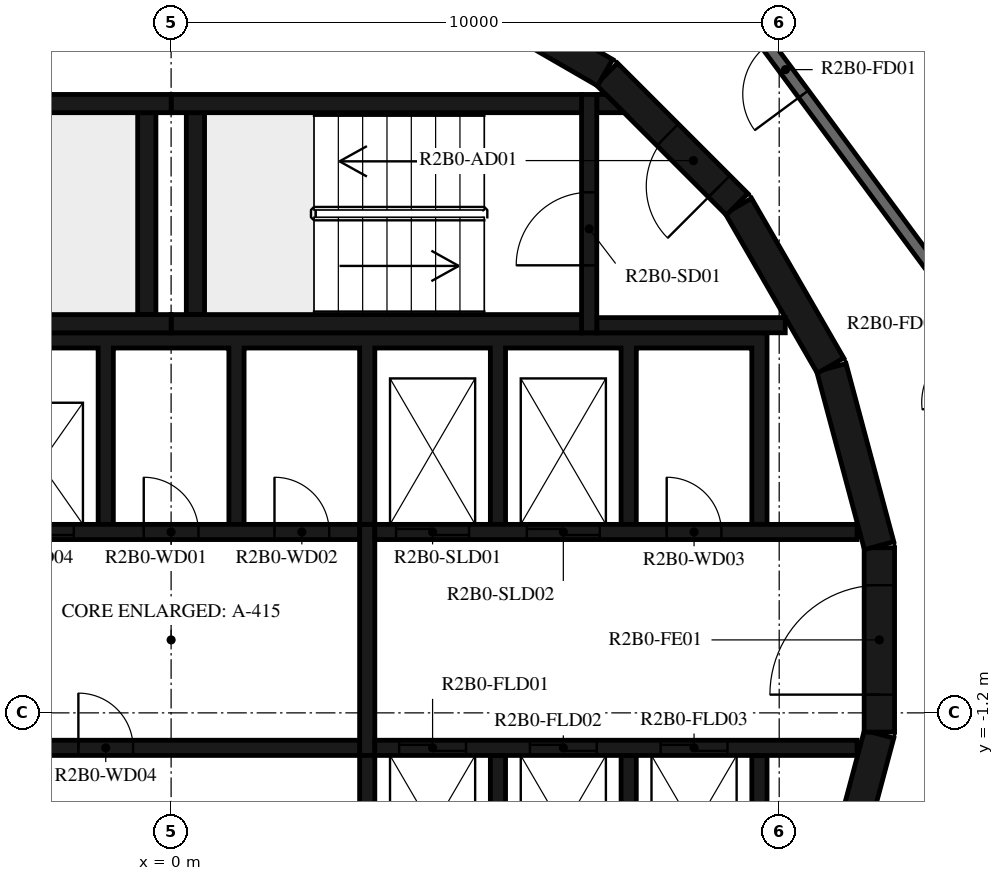
"""IFC4 building model, lengths in metres.
Left out: names, types, materials, properties, quantities, classifications, styles, units other than length and angle.
Written with IfcOpenShell. Run it as: python <this file> out.ifc"""

import sys

from ifc_helpers import new_model, si_unit, direction, frame, frame_2d, origin, place, context, subcontext, project, spatial, polyline, rectangle, outline, extrude, element, fill, save


model = new_model("IFC4")
c1 = context("Model", 3, precision=1e-05, world=origin(), true_north=direction((0.0, 1.0)))
c2 = subcontext(c1, "Body", "Model", "MODEL_VIEW")
j1 = project(units=[si_unit("LENGTHUNIT", "METRE"), si_unit("PLANEANGLEUNIT", "RADIAN")], contexts=[c1])
p1 = place(None, origin())
s1 = spatial("IfcSite", under=j1, at=p1, CompositionType="ELEMENT")
p2 = place(p1, origin())
s2 = spatial("IfcBuilding", under=s1, at=p2, CompositionType="ELEMENT")
p3 = place(p2, frame((0.0, 0.0, 90.7)))
s3 = spatial("IfcBuildingStorey", under=s2, at=p3, CompositionType="ELEMENT", Elevation=90.7)
p4 = place(p3, frame((10.858, -4.479, 0.0), z_axis=(0.0, 0.0, 1.0), x_axis=(0.258734743916, 0.965948410781, 0.0)))
e1 = element("IfcWall", 1, at=p4, inside=s3, PredefinedType="SHEAR", context=c2, shape_type="SweptSolid", body=[
    extrude(rectangle(XDim=3.033, YDim=0.5, at=frame_2d((1.516, 0.0))), origin(), (0.0, 0.0, 1.0), 3.12),
])
p5 = place(p3, frame((11.647, -1.516, 0.0), z_axis=(0.0, 0.0, 1.0), x_axis=(0.0, 1.0, 0.0)))
e2 = element("IfcWall", 2, at=p5, inside=s3, PredefinedType="SHEAR", context=c2, shape_type="SweptSolid", body=[
    extrude(rectangle(XDim=3.033, YDim=0.5, at=frame_2d((1.516, 0.0))), origin(), (0.0, 0.0, 1.0), 3.12),
])
p6 = place(p5, frame((0.616, 0.0, 0.0)))
e3 = element("IfcOpeningElement", 3, at=p6, cuts=e2, PredefinedType="OPENING", context=c2, shape_type="SweptSolid", body=[
    extrude(rectangle(XDim=1.8, YDim=2.1, at=frame_2d((0.9, 1.05))), frame((0.0, 0.26, 0.0), z_axis=(0.0, -1.0, 0.0), x_axis=(1.0, 0.0, 0.0)), (0.0, 0.0, 1.0), 0.52),
])
for number, where, z_axis, x_axis in (
    (4, (11.643, 1.55, 0.0), (0.0, 0.0, 1.0), (-0.259, 0.966, 0.0)),
    (5, (10.845, 4.51, 0.0), (0.0, 0.0, 1.0), (-0.5, 0.866, 0.0)),
):
    element("IfcWall", number, at=place(p3, frame(where, z_axis=z_axis, x_axis=x_axis)), inside=s3, PredefinedType="SHEAR", context=c2, shape_type="SweptSolid", body=[
        extrude(rectangle(XDim=3.033, YDim=0.5, at=frame_2d((1.516, 0.0))), origin(), (0.0, 0.0, 1.0), 3.12),
    ])
p7 = place(p3, frame((9.308, 7.164, 0.0), z_axis=(0.0, 0.0, 1.0), x_axis=(-0.707106781187, 0.707106781187, 0.0)))
e6 = element("IfcWall", 6, at=p7, inside=s3, PredefinedType="SHEAR", context=c2, shape_type="SweptSolid", body=[
    extrude(rectangle(XDim=3.032, YDim=0.5, at=frame_2d((1.516, 0.0))), origin(), (0.0, 0.0, 1.0), 3.12),
])
p8 = place(p7, frame((0.416, 0.0, 0.0)))
e7 = element("IfcOpeningElement", 7, at=p8, cuts=e6, PredefinedType="OPENING", context=c2, shape_type="SweptSolid", body=[
    extrude(rectangle(XDim=1.2, YDim=2.1, at=frame_2d((0.6, 1.05))), frame((0.0, 0.26, 0.0), z_axis=(0.0, -1.0, 0.0), x_axis=(1.0, 0.0, 0.0)), (0.0, 0.0, 1.0), 0.52),
])
p9 = place(p3, frame((7.137, 9.329, 0.0), z_axis=(0.0, 0.0, 1.0), x_axis=(-0.865975092491, 0.500087131594, 0.0)))
e8 = element("IfcWall", 8, at=p9, inside=s3, PredefinedType="SHEAR", context=c2, shape_type="SweptSolid", body=[
    extrude(rectangle(XDim=3.033, YDim=0.5, at=frame_2d((1.516, 0.0))), origin(), (0.0, 0.0, 1.0), 3.12),
])
for number, where, z_axis, x_axis in (
    (9, (0.0, 5.2, 0.0), (0.0, 0.0, 1.0), (1.0, 0.0, 0.0)),
    (10, (0.0, 8.82, 0.0), (0.0, 0.0, 1.0), (1.0, 0.0, 0.0)),
):
    element("IfcWall", number, at=place(p3, frame(where, z_axis=z_axis, x_axis=x_axis)), inside=s3, PredefinedType="SHEAR", context=c2, shape_type="SweptSolid", body=[
        extrude(rectangle(XDim=6.75, YDim=0.3, at=frame_2d((3.375, 0.0))), origin(), (0.0, 0.0, 1.0), 3.12),
    ])
p10 = place(p3, frame((0.4, 5.35, 0.0), z_axis=(0.0, 0.0, 1.0), x_axis=(0.0, 1.0, 0.0)))
e11 = element("IfcWall", 11, at=p10, inside=s3, PredefinedType="SHEAR", context=c2, shape_type="SweptSolid", body=[
    extrude(rectangle(XDim=3.32, YDim=0.3, at=frame_2d((1.66, 0.0))), origin(), (0.0, 0.0, 1.0), 3.12),
])
p11 = place(p3, frame((6.875, 5.05, 0.0), z_axis=(0.0, 0.0, 1.0), x_axis=(0.0, 1.0, 0.0)))
e12 = element("IfcWall", 12, at=p11, inside=s3, PredefinedType="SHEAR", context=c2, shape_type="SweptSolid", body=[
    extrude(rectangle(XDim=3.92, YDim=0.25, at=frame_2d((1.96, 0.0))), origin(), (0.0, 0.0, 1.0), 3.12),
])
p12 = place(p11, frame((1.11, 0.0, 0.0)))
e13 = element("IfcOpeningElement", 13, at=p12, cuts=e12, PredefinedType="OPENING", context=c2, shape_type="SweptSolid", body=[
    extrude(rectangle(XDim=1.2, YDim=2.1, at=frame_2d((0.6, 1.05))), frame((0.0, 0.135, 0.0), z_axis=(0.0, -1.0, 0.0), x_axis=(1.0, 0.0, 0.0)), (0.0, 0.0, 1.0), 0.27),
])
p13 = place(p3, frame((7.0, 5.175, 0.0), z_axis=(0.0, 0.0, 1.0), x_axis=(1.0, 0.0, 0.0)))
e14 = element("IfcWall", 14, at=p13, inside=s3, PredefinedType="SHEAR", context=c2, shape_type="SweptSolid", body=[
    extrude(rectangle(XDim=3.1, YDim=0.25, at=frame_2d((1.55, 0.0))), origin(), (0.0, 0.0, 1.0), 3.12),
])
p14 = place(p3, origin())
e15 = element("IfcWall", 15, at=p14, inside=s3, PredefinedType="SHEAR", context=c2, shape_type="SweptSolid", body=[
    extrude(outline(polyline([(7.448, 8.67), (7.0, 8.67), (7.0, 8.97), (7.148, 8.97), (7.448, 8.67)])), origin(), (0.0, 0.0, 1.0), 3.12),
])
for number, where, z_axis, x_axis in (
    (16, (-6.75, 5.2, 0.0), (0.0, 0.0, 1.0), (1.0, 0.0, 0.0)),
    (17, (-6.75, 8.82, 0.0), (0.0, 0.0, 1.0), (1.0, 0.0, 0.0)),
):
    element("IfcWall", number, at=place(p3, frame(where, z_axis=z_axis, x_axis=x_axis)), inside=s3, PredefinedType="SHEAR", context=c2, shape_type="SweptSolid", body=[
        extrude(rectangle(XDim=6.75, YDim=0.3, at=frame_2d((3.375, 0.0))), origin(), (0.0, 0.0, 1.0), 3.12),
    ])
p15 = place(p3, frame((-0.4, 5.35, 0.0), z_axis=(0.0, 0.0, 1.0), x_axis=(0.0, 1.0, 0.0)))
e18 = element("IfcWall", 18, at=p15, inside=s3, PredefinedType="SHEAR", context=c2, shape_type="SweptSolid", body=[
    extrude(rectangle(XDim=3.32, YDim=0.3, at=frame_2d((1.66, 0.0))), origin(), (0.0, 0.0, 1.0), 3.12),
])
p16 = place(p3, origin())
e19 = element("IfcWall", 19, at=p16, inside=s3, PredefinedType="SHEAR", context=c2, shape_type="SweptSolid", body=[
    extrude(outline(polyline([(-9.55, 4.8), (-7.65, 4.8), (-7.65, 1.9), (-7.4, 1.9), (-7.4, 4.8), (-5.5, 4.8), (-5.5, 1.9), (-5.25, 1.9), (-5.25, 4.8), (-3.35, 4.8), (-3.35, 1.9), (-3.1, 1.9), (-3.1, 4.8), (-1.2, 4.8), (-1.2, 1.9), (-0.95, 1.9), (-0.95, 4.8), (0.95, 4.8), (0.95, 1.9), (1.2, 1.9), (1.2, 4.8), (3.1, 4.8), (3.1, 1.9), (3.35, 1.9), (3.35, 4.8), (5.25, 4.8), (5.25, 1.9), (5.5, 1.9), (5.5, 4.8), (7.4, 4.8), (7.4, 1.9), (7.65, 1.9), (7.65, 4.8), (9.55, 4.8), (9.55, 1.9), (9.8, 1.9), (9.8, 4.8), (9.8, 5.05), (-9.8, 5.05), (-9.8, 4.8), (-9.8, 1.9), (-9.55, 1.9), (-9.55, 4.8)])), origin(), (0.0, 0.0, 1.0), 3.12),
])
p17 = place(p3, origin())
e20 = element("IfcWall", 20, at=p17, inside=s3, PredefinedType="SHEAR", context=c2, shape_type="SweptSolid", body=[
    extrude(outline(polyline([(9.8, -5.05), (9.8, -4.8), (9.8, -1.9), (9.55, -1.9), (9.55, -4.8), (7.65, -4.8), (7.65, -1.9), (7.4, -1.9), (7.4, -4.8), (5.5, -4.8), (5.5, -1.9), (5.25, -1.9), (5.25, -4.8), (3.35, -4.8), (3.35, -1.9), (3.1, -1.9), (3.1, -4.8), (-5.25, -4.8), (-5.25, -1.9), (-5.5, -1.9), (-5.5, -4.8), (-7.4, -4.8), (-7.4, -1.9), (-7.65, -1.9), (-7.65, -4.8), (-9.55, -4.8), (-9.55, -1.9), (-9.8, -1.9), (-9.8, -4.8), (-9.8, -5.05), (9.8, -5.05)])), origin(), (0.0, 0.0, 1.0), 3.12),
])
p18 = place(p3, frame((-11.28, 1.775, 0.0), z_axis=(0.0, 0.0, 1.0), x_axis=(1.0, 0.0, 0.0)))
e21 = element("IfcWall", 21, at=p18, inside=s3, PredefinedType="SHEAR", context=c2, shape_type="SweptSolid", body=[
    extrude(rectangle(XDim=14.38, YDim=0.25, at=frame_2d((7.19, 0.0))), origin(), (0.0, 0.0, 1.0), 3.12),
])
p19 = place(p18, frame((2.13, 0.0, 0.0)))
e22 = element("IfcOpeningElement", 22, at=p19, cuts=e21, PredefinedType="OPENING", context=c2, shape_type="SweptSolid", body=[
    extrude(rectangle(XDim=1.1, YDim=2.1, at=frame_2d((0.55, 1.05))), frame((0.0, 0.135, 0.0), z_axis=(0.0, -1.0, 0.0), x_axis=(1.0, 0.0, 0.0)), (0.0, 0.0, 1.0), 0.27),
])
p20 = place(p18, frame((4.28, 0.0, 0.0)))
e23 = element("IfcOpeningElement", 23, at=p20, cuts=e21, PredefinedType="OPENING", context=c2, shape_type="SweptSolid", body=[
    extrude(rectangle(XDim=1.1, YDim=2.1, at=frame_2d((0.55, 1.05))), frame((0.0, 0.135, 0.0), z_axis=(0.0, -1.0, 0.0), x_axis=(1.0, 0.0, 0.0)), (0.0, 0.0, 1.0), 0.27),
])
p21 = place(p18, frame((6.43, 0.0, 0.0)))
e24 = element("IfcOpeningElement", 24, at=p21, cuts=e21, PredefinedType="OPENING", context=c2, shape_type="SweptSolid", body=[
    extrude(rectangle(XDim=1.1, YDim=2.1, at=frame_2d((0.55, 1.05))), frame((0.0, 0.135, 0.0), z_axis=(0.0, -1.0, 0.0), x_axis=(1.0, 0.0, 0.0)), (0.0, 0.0, 1.0), 0.27),
])
p22 = place(p18, frame((8.58, 0.0, 0.0)))
e25 = element("IfcOpeningElement", 25, at=p22, cuts=e21, PredefinedType="OPENING", context=c2, shape_type="SweptSolid", body=[
    extrude(rectangle(XDim=1.1, YDim=2.1, at=frame_2d((0.55, 1.05))), frame((0.0, 0.135, 0.0), z_axis=(0.0, -1.0, 0.0), x_axis=(1.0, 0.0, 0.0)), (0.0, 0.0, 1.0), 0.27),
])
p23 = place(p18, frame((10.83, 0.0, 0.0)))
e26 = element("IfcOpeningElement", 26, at=p23, cuts=e21, PredefinedType="OPENING", context=c2, shape_type="SweptSolid", body=[
    extrude(rectangle(XDim=0.9, YDim=2.1, at=frame_2d((0.45, 1.05))), frame((0.0, 0.135, 0.0), z_axis=(0.0, -1.0, 0.0), x_axis=(1.0, 0.0, 0.0)), (0.0, 0.0, 1.0), 0.27),
])
p24 = place(p18, frame((12.98, 0.0, 0.0)))
e27 = element("IfcOpeningElement", 27, at=p24, cuts=e21, PredefinedType="OPENING", context=c2, shape_type="SweptSolid", body=[
    extrude(rectangle(XDim=0.9, YDim=2.1, at=frame_2d((0.45, 1.05))), frame((0.0, 0.135, 0.0), z_axis=(0.0, -1.0, 0.0), x_axis=(1.0, 0.0, 0.0)), (0.0, 0.0, 1.0), 0.27),
])
p25 = place(p3, frame((3.35, 1.775, 0.0), z_axis=(0.0, 0.0, 1.0), x_axis=(1.0, 0.0, 0.0)))
e28 = element("IfcWall", 28, at=p25, inside=s3, PredefinedType="SHEAR", context=c2, shape_type="SweptSolid", body=[
    extrude(rectangle(XDim=7.93, YDim=0.25, at=frame_2d((3.965, 0.0))), origin(), (0.0, 0.0, 1.0), 3.12),
])
p26 = place(p25, frame((0.35, 0.0, 0.0)))
e29 = element("IfcOpeningElement", 29, at=p26, cuts=e28, PredefinedType="OPENING", context=c2, shape_type="SweptSolid", body=[
    extrude(rectangle(XDim=1.2, YDim=2.4, at=frame_2d((0.6, 1.2))), frame((0.0, 0.135, 0.0), z_axis=(0.0, -1.0, 0.0), x_axis=(1.0, 0.0, 0.0)), (0.0, 0.0, 1.0), 0.27),
])
p27 = place(p25, frame((2.5, 0.0, 0.0)))
e30 = element("IfcOpeningElement", 30, at=p27, cuts=e28, PredefinedType="OPENING", context=c2, shape_type="SweptSolid", body=[
    extrude(rectangle(XDim=1.2, YDim=2.4, at=frame_2d((0.6, 1.2))), frame((0.0, 0.135, 0.0), z_axis=(0.0, -1.0, 0.0), x_axis=(1.0, 0.0, 0.0)), (0.0, 0.0, 1.0), 0.27),
])
p28 = place(p25, frame((4.8, 0.0, 0.0)))
e31 = element("IfcOpeningElement", 31, at=p28, cuts=e28, PredefinedType="OPENING", context=c2, shape_type="SweptSolid", body=[
    extrude(rectangle(XDim=0.9, YDim=2.1, at=frame_2d((0.45, 1.05))), frame((0.0, 0.135, 0.0), z_axis=(0.0, -1.0, 0.0), x_axis=(1.0, 0.0, 0.0)), (0.0, 0.0, 1.0), 0.27),
])
p29 = place(p3, frame((-11.28, -1.775, 0.0), z_axis=(0.0, 0.0, 1.0), x_axis=(1.0, 0.0, 0.0)))
e32 = element("IfcWall", 32, at=p29, inside=s3, PredefinedType="SHEAR", context=c2, shape_type="SweptSolid", body=[
    extrude(rectangle(XDim=14.38, YDim=0.25, at=frame_2d((7.19, 0.0))), origin(), (0.0, 0.0, 1.0), 3.12),
])
p30 = place(p29, frame((9.755, 0.0, 0.0)))
e33 = element("IfcOpeningElement", 33, at=p30, cuts=e32, PredefinedType="OPENING", context=c2, shape_type="SweptSolid", body=[
    extrude(rectangle(XDim=0.9, YDim=2.1, at=frame_2d((0.45, 1.05))), frame((0.0, 0.135, 0.0), z_axis=(0.0, -1.0, 0.0), x_axis=(1.0, 0.0, 0.0)), (0.0, 0.0, 1.0), 0.27),
])
p31 = place(p3, frame((3.35, -1.775, 0.0), z_axis=(0.0, 0.0, 1.0), x_axis=(1.0, 0.0, 0.0)))
e34 = element("IfcWall", 34, at=p31, inside=s3, PredefinedType="SHEAR", context=c2, shape_type="SweptSolid", body=[
    extrude(rectangle(XDim=7.93, YDim=0.25, at=frame_2d((3.965, 0.0))), origin(), (0.0, 0.0, 1.0), 3.12),
])
p32 = place(p31, frame((0.4, 0.0, 0.0)))
e35 = element("IfcOpeningElement", 35, at=p32, cuts=e34, PredefinedType="OPENING", context=c2, shape_type="SweptSolid", body=[
    extrude(rectangle(XDim=1.1, YDim=2.4, at=frame_2d((0.55, 1.2))), frame((0.0, 0.135, 0.0), z_axis=(0.0, -1.0, 0.0), x_axis=(1.0, 0.0, 0.0)), (0.0, 0.0, 1.0), 0.27),
])
p33 = place(p31, frame((2.55, 0.0, 0.0)))
e36 = element("IfcOpeningElement", 36, at=p33, cuts=e34, PredefinedType="OPENING", context=c2, shape_type="SweptSolid", body=[
    extrude(rectangle(XDim=1.1, YDim=2.4, at=frame_2d((0.55, 1.2))), frame((0.0, 0.135, 0.0), z_axis=(0.0, -1.0, 0.0), x_axis=(1.0, 0.0, 0.0)), (0.0, 0.0, 1.0), 0.27),
])
p34 = place(p31, frame((4.7, 0.0, 0.0)))
e37 = element("IfcOpeningElement", 37, at=p34, cuts=e34, PredefinedType="OPENING", context=c2, shape_type="SweptSolid", body=[
    extrude(rectangle(XDim=1.1, YDim=2.4, at=frame_2d((0.55, 1.2))), frame((0.0, 0.135, 0.0), z_axis=(0.0, -1.0, 0.0), x_axis=(1.0, 0.0, 0.0)), (0.0, 0.0, 1.0), 0.27),
])
p35 = place(p3, frame((3.225, -1.9, 0.0), z_axis=(0.0, 0.0, 1.0), x_axis=(0.0, 1.0, 0.0)))
e38 = element("IfcWall", 38, at=p35, inside=s3, PredefinedType="SHEAR", context=c2, shape_type="SweptSolid", body=[
    extrude(rectangle(XDim=3.8, YDim=0.25, at=frame_2d((1.9, 0.0))), origin(), (0.0, 0.0, 1.0), 3.12),
])
p36 = place(p3, frame((13.196, 5.198, 0.0), z_axis=(0.0, 0.0, 1.0), x_axis=(-0.594805187394, 0.803869883159, 0.0)))
e39 = element("IfcWall", 39, at=p36, inside=s3, PredefinedType="STANDARD", context=c2, shape_type="SweptSolid", body=[
    extrude(rectangle(XDim=7.342, YDim=0.2, at=frame_2d((3.671, 0.0))), origin(), (0.0, 0.0, 1.0), 3.12),
])
p37 = place(p36, frame((4.7, 0.0, 0.0)))
e40 = element("IfcOpeningElement", 40, at=p37, cuts=e39, PredefinedType="OPENING", context=c2, shape_type="SweptSolid", body=[
    extrude(rectangle(XDim=1.0, YDim=2.1, at=frame_2d((0.5, 1.05))), frame((0.0, 0.11, 0.0), z_axis=(0.0, -1.0, 0.0), x_axis=(1.0, 0.0, 0.0)), (0.0, 0.0, 1.0), 0.22),
])
p38 = place(p3, frame((11.1, -8.829, 0.0), z_axis=(0.0, 0.0, 1.0), x_axis=(0.398741918631, 0.917063183388, 0.0)))
e41 = element("IfcWall", 41, at=p38, inside=s3, PredefinedType="STANDARD", context=c2, shape_type="SweptSolid", body=[
    extrude(rectangle(XDim=7.342, YDim=0.2, at=frame_2d((3.671, 0.0))), origin(), (0.0, 0.0, 1.0), 3.12),
])
p39 = place(p3, frame((13.995, 8.336, 0.0), z_axis=(0.0, 0.0, 1.0), x_axis=(-0.59480284986, 0.803871612758, 0.0)))
e42 = element("IfcWall", 42, at=p39, inside=s3, PredefinedType="PARTITIONING", context=c2, shape_type="SweptSolid", body=[
    extrude(rectangle(XDim=4.4, YDim=0.12, at=frame_2d((2.2, 0.0))), origin(), (0.0, 0.0, 1.0), 3.12),
])
p40 = place(p12, origin())
e43 = element("IfcDoor", 43, at=p40, inside=s3, OperationType="SINGLE_SWING_LEFT", PredefinedType="DOOR", context=c2, shape_type="SweptSolid", body=[
    extrude(rectangle(XDim=1.2, YDim=2.1, at=frame_2d((0.6, 1.05))), frame((0.0, 0.025, 0.0), z_axis=(0.0, -1.0, 0.0), x_axis=(1.0, 0.0, 0.0)), (0.0, 0.0, 1.0), 0.05),
])
fill(e13, e43)
p41 = place(p8, origin())
e44 = element("IfcDoor", 44, at=p41, inside=s3, OperationType="SINGLE_SWING_RIGHT", PredefinedType="DOOR", context=c2, shape_type="SweptSolid", body=[
    extrude(rectangle(XDim=1.2, YDim=2.1, at=frame_2d((0.6, 1.05))), frame((0.0, 0.025, 0.0), z_axis=(0.0, -1.0, 0.0), x_axis=(1.0, 0.0, 0.0)), (0.0, 0.0, 1.0), 0.05),
])
fill(e7, e44)
p42 = place(p6, origin())
e45 = element("IfcDoor", 45, at=p42, inside=s3, OperationType="DOUBLE_DOOR_SINGLE_SWING", PredefinedType="DOOR", context=c2, shape_type="SweptSolid", body=[
    extrude(rectangle(XDim=1.8, YDim=2.1, at=frame_2d((0.9, 1.05))), frame((0.0, 0.025, 0.0), z_axis=(0.0, -1.0, 0.0), x_axis=(1.0, 0.0, 0.0)), (0.0, 0.0, 1.0), 0.05),
])
fill(e3, e45)
p43 = place(p22, origin())
e46 = element("IfcDoor", 46, at=p43, inside=s3, OperationType="DOUBLE_DOOR_SLIDING", PredefinedType="DOOR", context=c2, shape_type="SweptSolid", body=[
    extrude(rectangle(XDim=1.1, YDim=2.1, at=frame_2d((0.55, 1.05))), frame((0.0, 0.025, 0.0), z_axis=(0.0, -1.0, 0.0), x_axis=(1.0, 0.0, 0.0)), (0.0, 0.0, 1.0), 0.05),
])
fill(e25, e46)
p44 = place(p26, origin())
e47 = element("IfcDoor", 47, at=p44, inside=s3, OperationType="DOUBLE_DOOR_SLIDING", PredefinedType="DOOR", context=c2, shape_type="SweptSolid", body=[
    extrude(rectangle(XDim=1.2, YDim=2.4, at=frame_2d((0.6, 1.2))), frame((0.0, 0.025, 0.0), z_axis=(0.0, -1.0, 0.0), x_axis=(1.0, 0.0, 0.0)), (0.0, 0.0, 1.0), 0.05),
])
fill(e29, e47)
p45 = place(p27, origin())
e48 = element("IfcDoor", 48, at=p45, inside=s3, OperationType="DOUBLE_DOOR_SLIDING", PredefinedType="DOOR", context=c2, shape_type="SweptSolid", body=[
    extrude(rectangle(XDim=1.2, YDim=2.4, at=frame_2d((0.6, 1.2))), frame((0.0, 0.025, 0.0), z_axis=(0.0, -1.0, 0.0), x_axis=(1.0, 0.0, 0.0)), (0.0, 0.0, 1.0), 0.05),
])
fill(e30, e48)
p46 = place(p32, origin())
e49 = element("IfcDoor", 49, at=p46, inside=s3, OperationType="DOUBLE_DOOR_SLIDING", PredefinedType="DOOR", context=c2, shape_type="SweptSolid", body=[
    extrude(rectangle(XDim=1.1, YDim=2.4, at=frame_2d((0.55, 1.2))), frame((0.0, 0.025, 0.0), z_axis=(0.0, -1.0, 0.0), x_axis=(1.0, 0.0, 0.0)), (0.0, 0.0, 1.0), 0.05),
])
fill(e35, e49)
p47 = place(p33, origin())
e50 = element("IfcDoor", 50, at=p47, inside=s3, OperationType="DOUBLE_DOOR_SLIDING", PredefinedType="DOOR", context=c2, shape_type="SweptSolid", body=[
    extrude(rectangle(XDim=1.1, YDim=2.4, at=frame_2d((0.55, 1.2))), frame((0.0, 0.025, 0.0), z_axis=(0.0, -1.0, 0.0), x_axis=(1.0, 0.0, 0.0)), (0.0, 0.0, 1.0), 0.05),
])
fill(e36, e50)
p48 = place(p34, origin())
e51 = element("IfcDoor", 51, at=p48, inside=s3, OperationType="DOUBLE_DOOR_SLIDING", PredefinedType="DOOR", context=c2, shape_type="SweptSolid", body=[
    extrude(rectangle(XDim=1.1, YDim=2.4, at=frame_2d((0.55, 1.2))), frame((0.0, 0.025, 0.0), z_axis=(0.0, -1.0, 0.0), x_axis=(1.0, 0.0, 0.0)), (0.0, 0.0, 1.0), 0.05),
])
fill(e37, e51)
p49 = place(p23, origin())
e52 = element("IfcDoor", 52, at=p49, inside=s3, OperationType="SINGLE_SWING_RIGHT", PredefinedType="DOOR", context=c2, shape_type="SweptSolid", body=[
    extrude(rectangle(XDim=0.9, YDim=2.1, at=frame_2d((0.45, 1.05))), frame((0.0, 0.025, 0.0), z_axis=(0.0, -1.0, 0.0), x_axis=(1.0, 0.0, 0.0)), (0.0, 0.0, 1.0), 0.05),
])
fill(e26, e52)
p50 = place(p24, origin())
e53 = element("IfcDoor", 53, at=p50, inside=s3, OperationType="SINGLE_SWING_LEFT", PredefinedType="DOOR", context=c2, shape_type="SweptSolid", body=[
    extrude(rectangle(XDim=0.9, YDim=2.1, at=frame_2d((0.45, 1.05))), frame((0.0, 0.025, 0.0), z_axis=(0.0, -1.0, 0.0), x_axis=(1.0, 0.0, 0.0)), (0.0, 0.0, 1.0), 0.05),
])
fill(e27, e53)
p51 = place(p28, origin())
e54 = element("IfcDoor", 54, at=p51, inside=s3, OperationType="SINGLE_SWING_RIGHT", PredefinedType="DOOR", context=c2, shape_type="SweptSolid", body=[
    extrude(rectangle(XDim=0.9, YDim=2.1, at=frame_2d((0.45, 1.05))), frame((0.0, 0.025, 0.0), z_axis=(0.0, -1.0, 0.0), x_axis=(1.0, 0.0, 0.0)), (0.0, 0.0, 1.0), 0.05),
])
fill(e31, e54)
p52 = place(p30, origin())
e55 = element("IfcDoor", 55, at=p52, inside=s3, OperationType="SINGLE_SWING_LEFT", PredefinedType="DOOR", context=c2, shape_type="SweptSolid", body=[
    extrude(rectangle(XDim=0.9, YDim=2.1, at=frame_2d((0.45, 1.05))), frame((0.0, 0.025, 0.0), z_axis=(0.0, -1.0, 0.0), x_axis=(1.0, 0.0, 0.0)), (0.0, 0.0, 1.0), 0.05),
])
fill(e33, e55)
p53 = place(p37, origin())
e56 = element("IfcDoor", 56, at=p53, inside=s3, OperationType="SINGLE_SWING_RIGHT", PredefinedType="DOOR", context=c2, shape_type="SweptSolid", body=[
    extrude(rectangle(XDim=1.0, YDim=2.1, at=frame_2d((0.5, 1.05))), frame((0.0, 0.025, 0.0), z_axis=(0.0, -1.0, 0.0), x_axis=(1.0, 0.0, 0.0)), (0.0, 0.0, 1.0), 0.05),
])
fill(e40, e56)
save(model, sys.argv[1])
